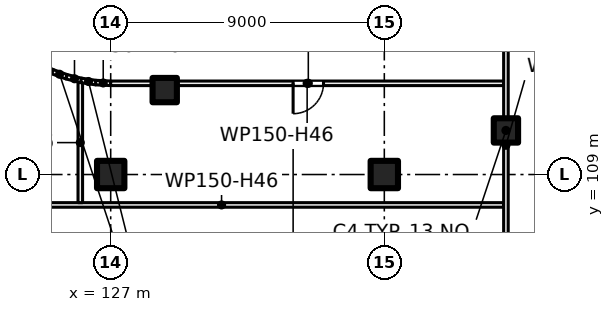
"""IFC4 building model, lengths in metres.
Left out: names, types, materials, properties, quantities, classifications, styles, units other than length and angle.
Written with IfcOpenShell. Run it as: python <this file> out.ifc"""

import sys

from ifc_helpers import new_model, si_unit, direction, frame, frame_2d, origin, origin_2d, place, context, subcontext, project, spatial, rectangle, extrude, element, fill, save


model = new_model("IFC4")
c1 = context("Model", 3, precision=1e-05, world=origin(), true_north=direction((0.0, 1.0)))
c2 = subcontext(c1, "Body", "Model", "MODEL_VIEW")
j1 = project(units=[si_unit("LENGTHUNIT", "METRE"), si_unit("PLANEANGLEUNIT", "RADIAN")], contexts=[c1])
p1 = place(None, origin())
s1 = spatial("IfcSite", under=j1, at=p1, CompositionType="ELEMENT")
p2 = place(p1, origin())
s2 = spatial("IfcBuilding", under=s1, at=p2, CompositionType="ELEMENT")
p3 = place(p2, frame((0.0, 0.0, 7.5)))
s3 = spatial("IfcBuildingStorey", under=s2, at=p3, CompositionType="ELEMENT", Elevation=7.5)
for number, where, z_axis, x_axis in (
    (1, (127.0, 109.0, 0.0), (0.0, 0.0, 1.0), (1.0, 0.0, 0.0)),
    (2, (136.0, 109.0, 0.0), (0.0, 0.0, 1.0), (1.0, 0.0, 0.0)),
):
    element("IfcColumn", number, at=place(p3, frame(where, z_axis=z_axis, x_axis=x_axis)), inside=s3, PredefinedType="COLUMN", context=c2, shape_type="SweptSolid", body=[
        extrude(rectangle(XDim=0.9, YDim=0.9, at=origin_2d()), origin(), (0.0, 0.0, 1.0), 5.0),
    ])
for number, where, z_axis, x_axis in (
    (3, (128.777, 111.777, 0.0), (0.0, 0.0, 1.0), (1.0, 0.0, 0.0)),
    (4, (140.0, 110.45, 0.0), (0.0, 0.0, 1.0), (1.0, 0.0, 0.0)),
):
    element("IfcColumn", number, at=place(p3, frame(where, z_axis=z_axis, x_axis=x_axis)), inside=s3, PredefinedType="COLUMN", context=c2, shape_type="SweptSolid", body=[
        extrude(rectangle(XDim=0.8, YDim=0.8, at=origin_2d()), origin(), (0.0, 0.0, 1.0), 5.0),
    ])
p4 = place(p3, frame((121.368, 108.0, 0.0), z_axis=(0.0, 0.0, 1.0), x_axis=(1.0, 0.0, 0.0)))
e5 = element("IfcWall", 5, at=p4, inside=s3, PredefinedType="PARTITIONING", context=c2, shape_type="SweptSolid", body=[
    extrude(rectangle(XDim=18.557, YDim=0.15, at=frame_2d((9.279, 0.0))), origin(), (0.0, 0.0, 1.0), 4.6),
])
for number, where, z_axis, x_axis in (
    (6, (124.64, 112.592, 0.0), (0.0, 0.0, 1.0), (0.904, -0.428, 0.0)),
    (7, (125.084, 112.382, 0.0), (0.0, 0.0, 1.0), (0.941, -0.337, 0.0)),
):
    element("IfcWall", number, at=place(p3, frame(where, z_axis=z_axis, x_axis=x_axis)), inside=s3, PredefinedType="PARTITIONING", context=c2, shape_type="SweptSolid", body=[
        extrude(rectangle(XDim=0.498, YDim=0.15, at=frame_2d((0.249, 0.0))), origin(), (0.0, 0.0, 1.0), 4.6),
    ])
p5 = place(p3, frame((125.545, 112.216, 0.0), z_axis=(0.0, 0.0, 1.0), x_axis=(0.970116111764, -0.242641154168, 0.0)))
e8 = element("IfcWall", 8, at=p5, inside=s3, PredefinedType="PARTITIONING", context=c2, shape_type="SweptSolid", body=[
    extrude(rectangle(XDim=0.544, YDim=0.15, at=frame_2d((0.272, 0.0))), origin(), (0.0, 0.0, 1.0), 4.6),
])
p6 = place(p3, frame((126.0, 108.075, 0.0), z_axis=(0.0, 0.0, 1.0), x_axis=(0.0, 1.0, 0.0)))
e9 = element("IfcWall", 9, at=p6, inside=s3, PredefinedType="PARTITIONING", context=c2, shape_type="SweptSolid", body=[
    extrude(rectangle(XDim=3.95, YDim=0.15, at=frame_2d((1.975, 0.0))), origin(), (0.0, 0.0, 1.0), 4.6),
])
p7 = place(p3, frame((126.025, 112.096, 0.0), z_axis=(0.0, 0.0, 1.0), x_axis=(0.989041138834, -0.147640189971, 0.0)))
e10 = element("IfcWall", 10, at=p7, inside=s3, PredefinedType="PARTITIONING", context=c2, shape_type="SweptSolid", body=[
    extrude(rectangle(XDim=0.494, YDim=0.15, at=frame_2d((0.247, 0.0))), origin(), (0.0, 0.0, 1.0), 4.6),
])
p8 = place(p3, frame((126.506, 112.024, 0.0), z_axis=(0.0, 0.0, 1.0), x_axis=(0.998837896651, -0.048196018647, 0.0)))
e11 = element("IfcWall", 11, at=p8, inside=s3, PredefinedType="PARTITIONING", context=c2, shape_type="SweptSolid", body=[
    extrude(rectangle(XDim=0.496, YDim=0.15, at=frame_2d((0.248, 0.0))), origin(), (0.0, 0.0, 1.0), 4.6),
])
p9 = place(p3, frame((139.925, 112.0, 0.0), z_axis=(0.0, 0.0, 1.0), x_axis=(-1.0, 0.0, 0.0)))
e12 = element("IfcWall", 12, at=p9, inside=s3, PredefinedType="PARTITIONING", context=c2, shape_type="SweptSolid", body=[
    extrude(rectangle(XDim=12.927, YDim=0.15, at=frame_2d((6.463, 0.0))), origin(), (0.0, 0.0, 1.0), 4.6),
])
p10 = place(p9, frame((5.925, 0.0, 0.0)))
e13 = element("IfcOpeningElement", 13, at=p10, cuts=e12, PredefinedType="OPENING", context=c2, shape_type="SweptSolid", body=[
    extrude(rectangle(XDim=1.0, YDim=2.1, at=frame_2d((0.5, 1.05))), frame((0.0, 0.085, 0.0), z_axis=(0.0, -1.0, 0.0), x_axis=(1.0, 0.0, 0.0)), (0.0, 0.0, 1.0), 0.17),
])
p11 = place(p3, frame((140.0, 102.925, 0.0), z_axis=(0.0, 0.0, 1.0), x_axis=(0.0, 1.0, 0.0)))
e14 = element("IfcWall", 14, at=p11, inside=s3, PredefinedType="PARTITIONING", context=c2, shape_type="SweptSolid", body=[
    extrude(rectangle(XDim=14.075, YDim=0.15, at=frame_2d((7.038, 0.0))), origin(), (0.0, 0.0, 1.0), 4.6),
])
p12 = place(p11, frame((10.675, 0.0, 0.0)))
e15 = element("IfcOpeningElement", 15, at=p12, cuts=e14, PredefinedType="OPENING", context=c2, shape_type="SweptSolid", body=[
    extrude(rectangle(XDim=1.8, YDim=2.1, at=frame_2d((0.9, 1.05))), frame((0.0, 0.085, 0.0), z_axis=(0.0, -1.0, 0.0), x_axis=(1.0, 0.0, 0.0)), (0.0, 0.0, 1.0), 0.17),
])
p13 = place(p10, origin())
e16 = element("IfcDoor", 16, at=p13, inside=s3, OperationType="SINGLE_SWING_RIGHT", PredefinedType="DOOR", context=c2, shape_type="SweptSolid", body=[
    extrude(rectangle(XDim=1.0, YDim=2.1, at=frame_2d((0.5, 1.05))), frame((0.0, 0.025, 0.0), z_axis=(0.0, -1.0, 0.0), x_axis=(1.0, 0.0, 0.0)), (0.0, 0.0, 1.0), 0.05),
])
fill(e13, e16)
save(model, sys.argv[1])
